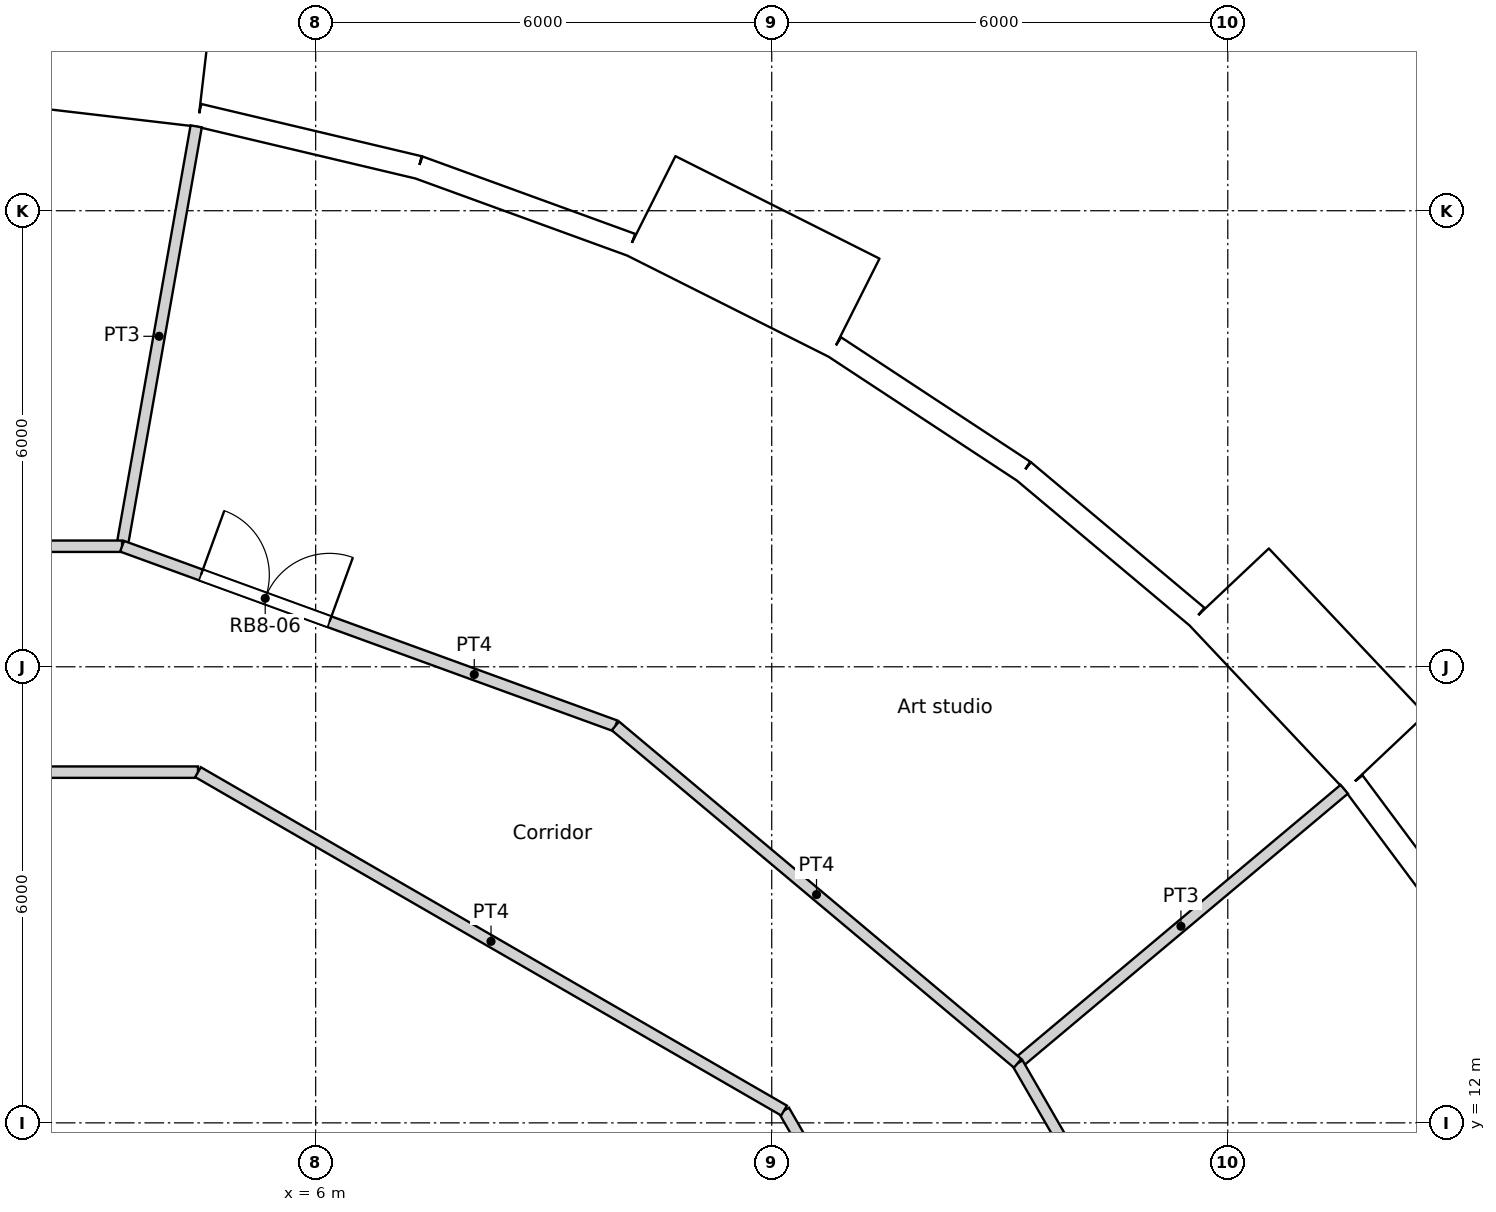
"""IFC4 building model, lengths in metres.
Left out: names, types, materials, properties, quantities, classifications, styles, units other than length and angle.
Written with IfcOpenShell. Run it as: python <this file> out.ifc"""

import sys

from ifc_helpers import new_model, si_unit, direction, frame, frame_2d, origin, origin_2d, place, context, subcontext, project, spatial, rectangle, circle, extrude, element, fill, save


model = new_model("IFC4")
c1 = context("Model", 3, precision=1e-05, world=origin(), true_north=direction((0.0, 1.0)))
c2 = subcontext(c1, "Body", "Model", "MODEL_VIEW")
j1 = project(units=[si_unit("LENGTHUNIT", "METRE"), si_unit("PLANEANGLEUNIT", "RADIAN")], contexts=[c1])
p1 = place(None, origin())
s1 = spatial("IfcSite", under=j1, at=p1, CompositionType="ELEMENT")
p2 = place(p1, origin())
s2 = spatial("IfcBuilding", under=s1, at=p2, CompositionType="ELEMENT")
p3 = place(p2, frame((0.0, 0.0, 201.6)))
s3 = spatial("IfcBuildingStorey", under=s2, at=p3, CompositionType="ELEMENT", Elevation=201.6)
for number, where, z_axis, x_axis in (
    (1, (18.805, 15.779, 0.0), (0.0, 0.0, 1.0), (1.0, 0.0, 0.0)),
    (2, (14.659, 19.69, 0.0), (0.0, 0.0, 1.0), (1.0, 0.0, 0.0)),
    (3, (9.723, 22.54, 0.0), (0.0, 0.0, 1.0), (1.0, 0.0, 0.0)),
    (4, (4.263, 24.175, 0.0), (0.0, 0.0, 1.0), (1.0, 0.0, 0.0)),
):
    element("IfcColumn", number, at=place(p3, frame(where, z_axis=z_axis, x_axis=x_axis)), inside=s3, PredefinedType="COLUMN", context=c2, shape_type="SweptSolid", body=[
        extrude(circle(Radius=0.6, at=origin_2d()), origin(), (0.0, 0.0, 1.0), 3.6),
    ])
for number, where, z_axis, x_axis in (
    (5, (11.735, 14.716, 0.0), (0.0, 0.0, 1.0), (1.0, 0.0, 0.0)),
    (6, (6.876, 17.521, 0.0), (0.0, 0.0, 1.0), (1.0, 0.0, 0.0)),
):
    element("IfcColumn", number, at=place(p3, frame(where, z_axis=z_axis, x_axis=x_axis)), inside=s3, PredefinedType="COLUMN", context=c2, shape_type="SweptSolid", body=[
        extrude(circle(Radius=0.65, at=origin_2d()), origin(), (0.0, 0.0, 1.0), 3.6),
    ])
p4 = place(p3, frame((21.428, 14.094, 0.0), z_axis=(0.0, 0.0, 1.0), x_axis=(-0.597197580538, 0.80209416517, 0.0)))
e7 = element("IfcWall", 7, at=p4, inside=s3, PredefinedType="SOLIDWALL", context=c2, shape_type="SweptSolid", body=[
    extrude(rectangle(XDim=2.973, YDim=0.3, at=frame_2d((1.486, 0.0))), origin(), (0.0, 0.0, 1.0), 3.3),
])
p5 = place(p4, frame((1.486, 0.0, 1.55)))
e8 = element("IfcOpeningElement", 8, at=p5, cuts=e7, PredefinedType="OPENING", context=c2, shape_type="SweptSolid", body=[
    extrude(circle(Radius=0.9, at=origin_2d()), frame((0.0, 0.16, 0.0), z_axis=(0.0, -1.0, 0.0), x_axis=(1.0, 0.0, 0.0)), (0.0, 0.0, 1.0), 0.32),
])
p6 = place(p3, frame((20.071, 16.874, -0.3), z_axis=(0.0, 0.0, 1.0), x_axis=(-0.686217177108, 0.727396718334, 0.0)))
e9 = element("IfcWall", 9, at=p6, inside=s3, PredefinedType="ELEMENTEDWALL", context=c2, shape_type="SweptSolid", body=[
    extrude(rectangle(XDim=3.0, YDim=1.45, at=frame_2d((1.5, 0.0))), origin(), (0.0, 0.0, 1.0), 3.6),
])
p7 = place(p6, frame((1.5, 0.0, 1.85)))
e10 = element("IfcOpeningElement", 10, at=p7, cuts=e9, PredefinedType="OPENING", context=c2, shape_type="SweptSolid", body=[
    extrude(circle(Radius=0.9, at=origin_2d()), frame((0.0, 0.735, 0.0), z_axis=(0.0, -1.0, 0.0), x_axis=(1.0, 0.0, 0.0)), (0.0, 0.0, 1.0), 1.47),
])
p8 = place(p3, frame((17.593, 18.661, 0.0), z_axis=(0.0, 0.0, 1.0), x_axis=(-0.766008913364, 0.642829950023, 0.0)))
e11 = element("IfcWall", 11, at=p8, inside=s3, PredefinedType="SOLIDWALL", context=c2, shape_type="SweptSolid", body=[
    extrude(rectangle(XDim=2.973, YDim=0.3, at=frame_2d((1.486, 0.0))), origin(), (0.0, 0.0, 1.0), 3.3),
])
p9 = place(p8, frame((1.486, 0.0, 1.55)))
e12 = element("IfcOpeningElement", 12, at=p9, cuts=e11, PredefinedType="OPENING", context=c2, shape_type="SweptSolid", body=[
    extrude(circle(Radius=0.9, at=origin_2d()), frame((0.0, 0.16, 0.0), z_axis=(0.0, -1.0, 0.0), x_axis=(1.0, 0.0, 0.0)), (0.0, 0.0, 1.0), 0.32),
])
p10 = place(p3, frame((15.316, 20.573, 0.0), z_axis=(0.0, 0.0, 1.0), x_axis=(-0.835508361394, 0.54947773207, 0.0)))
e13 = element("IfcWall", 13, at=p10, inside=s3, PredefinedType="SOLIDWALL", context=c2, shape_type="SweptSolid", body=[
    extrude(rectangle(XDim=2.973, YDim=0.3, at=frame_2d((1.486, 0.0))), origin(), (0.0, 0.0, 1.0), 3.3),
])
p11 = place(p10, frame((1.486, 0.0, 1.55)))
e14 = element("IfcOpeningElement", 14, at=p11, cuts=e13, PredefinedType="OPENING", context=c2, shape_type="SweptSolid", body=[
    extrude(circle(Radius=0.9, at=origin_2d()), frame((0.0, 0.16, 0.0), z_axis=(0.0, -1.0, 0.0), x_axis=(1.0, 0.0, 0.0)), (0.0, 0.0, 1.0), 0.32),
])
p12 = place(p3, frame((13.09, 22.721, -0.3), z_axis=(0.0, 0.0, 1.0), x_axis=(-0.893628249713, 0.448807922518, 0.0)))
e15 = element("IfcWall", 15, at=p12, inside=s3, PredefinedType="ELEMENTEDWALL", context=c2, shape_type="SweptSolid", body=[
    extrude(rectangle(XDim=3.0, YDim=1.45, at=frame_2d((1.5, 0.0))), origin(), (0.0, 0.0, 1.0), 3.6),
])
p13 = place(p12, frame((1.5, 0.0, 1.85)))
e16 = element("IfcOpeningElement", 16, at=p13, cuts=e15, PredefinedType="OPENING", context=c2, shape_type="SweptSolid", body=[
    extrude(circle(Radius=0.9, at=origin_2d()), frame((0.0, 0.735, 0.0), z_axis=(0.0, -1.0, 0.0), x_axis=(1.0, 0.0, 0.0)), (0.0, 0.0, 1.0), 1.47),
])
p14 = place(p3, frame((10.149, 23.553, 0.0), z_axis=(0.0, 0.0, 1.0), x_axis=(-0.939690282133, 0.342026568652, 0.0)))
e17 = element("IfcWall", 17, at=p14, inside=s3, PredefinedType="SOLIDWALL", context=c2, shape_type="SweptSolid", body=[
    extrude(rectangle(XDim=2.973, YDim=0.3, at=frame_2d((1.486, 0.0))), origin(), (0.0, 0.0, 1.0), 3.3),
])
p15 = place(p14, frame((1.486, 0.0, 1.55)))
e18 = element("IfcOpeningElement", 18, at=p15, cuts=e17, PredefinedType="OPENING", context=c2, shape_type="SweptSolid", body=[
    extrude(circle(Radius=0.9, at=origin_2d()), frame((0.0, 0.16, 0.0), z_axis=(0.0, -1.0, 0.0), x_axis=(1.0, 0.0, 0.0)), (0.0, 0.0, 1.0), 0.32),
])
p16 = place(p3, frame((7.356, 24.57, 0.0), z_axis=(0.0, 0.0, 1.0), x_axis=(-0.973045378923, 0.230613725862, 0.0)))
e19 = element("IfcWall", 19, at=p16, inside=s3, PredefinedType="SOLIDWALL", context=c2, shape_type="SweptSolid", body=[
    extrude(rectangle(XDim=2.973, YDim=0.3, at=frame_2d((1.486, 0.0))), origin(), (0.0, 0.0, 1.0), 3.3),
])
p17 = place(p16, frame((1.486, 0.0, 1.55)))
e20 = element("IfcOpeningElement", 20, at=p17, cuts=e19, PredefinedType="OPENING", context=c2, shape_type="SweptSolid", body=[
    extrude(circle(Radius=0.9, at=origin_2d()), frame((0.0, 0.16, 0.0), z_axis=(0.0, -1.0, 0.0), x_axis=(1.0, 0.0, 0.0)), (0.0, 0.0, 1.0), 0.32),
])
p18 = place(p3, frame((4.529, 25.828, -0.3), z_axis=(0.0, 0.0, 1.0), x_axis=(-0.9932342274, 0.116128246006, 0.0)))
e21 = element("IfcWall", 21, at=p18, inside=s3, PredefinedType="ELEMENTEDWALL", context=c2, shape_type="SweptSolid", body=[
    extrude(rectangle(XDim=3.0, YDim=1.45, at=frame_2d((1.5, 0.0))), origin(), (0.0, 0.0, 1.0), 3.6),
])
p19 = place(p18, frame((1.5, 0.0, 1.85)))
e22 = element("IfcOpeningElement", 22, at=p19, cuts=e21, PredefinedType="OPENING", context=c2, shape_type="SweptSolid", body=[
    extrude(circle(Radius=0.9, at=origin_2d()), frame((0.0, 0.735, 0.0), z_axis=(0.0, -1.0, 0.0), x_axis=(1.0, 0.0, 0.0)), (0.0, 0.0, 1.0), 1.47),
])
p20 = place(p3, frame((12.162, 12.162, 0.0), z_axis=(0.0, 0.0, 1.0), x_axis=(0.499961633463, -0.866047553582, 0.0)))
e23 = element("IfcWall", 23, at=p20, inside=s3, PredefinedType="PARTITIONING", context=c2, shape_type="SweptSolid", body=[
    extrude(rectangle(XDim=2.15, YDim=0.15, at=frame_2d((1.075, 0.0))), origin(), (0.0, 0.0, 1.0), 3.3),
])
p21 = place(p3, frame((15.235, 12.784, 0.0), z_axis=(0.0, 0.0, 1.0), x_axis=(0.499914202267, -0.866074933462, 0.0)))
e24 = element("IfcWall", 24, at=p21, inside=s3, PredefinedType="PARTITIONING", context=c2, shape_type="SweptSolid", body=[
    extrude(rectangle(XDim=6.907, YDim=0.15, at=frame_2d((3.454, 0.0))), origin(), (0.0, 0.0, 1.0), 3.3),
])
p22 = place(p21, frame((3.004, 0.0, 0.0)))
e25 = element("IfcOpeningElement", 25, at=p22, cuts=e24, PredefinedType="OPENING", context=c2, shape_type="SweptSolid", body=[
    extrude(rectangle(XDim=1.8, YDim=2.1, at=frame_2d((0.9, 1.05))), frame((0.0, 0.075, 0.0), z_axis=(0.0, -1.0, 0.0), x_axis=(1.0, 0.0, 0.0)), (0.0, 0.0, 1.0), 0.15),
])
p23 = place(p3, frame((9.943, 17.222, 0.0), z_axis=(0.0, 0.0, 1.0), x_axis=(0.766192104565, -0.642611592567, 0.0)))
e26 = element("IfcWall", 26, at=p23, inside=s3, PredefinedType="PARTITIONING", context=c2, shape_type="SweptSolid", body=[
    extrude(rectangle(XDim=6.906, YDim=0.15, at=frame_2d((3.453, 0.0))), origin(), (0.0, 0.0, 1.0), 3.3),
])
p24 = place(p3, frame((4.452, 16.614, 0.0), z_axis=(0.0, 0.0, 1.0), x_axis=(0.866005203721, -0.500034985904, 0.0)))
e27 = element("IfcWall", 27, at=p24, inside=s3, PredefinedType="PARTITIONING", context=c2, shape_type="SweptSolid", body=[
    extrude(rectangle(XDim=8.903, YDim=0.15, at=frame_2d((4.452, 0.0))), origin(), (0.0, 0.0, 1.0), 3.3),
])
p25 = place(p3, frame((-3.021, 16.614, 0.0), z_axis=(0.0, 0.0, 1.0), x_axis=(1.0, 0.0, 0.0)))
e28 = element("IfcWall", 28, at=p25, inside=s3, PredefinedType="PARTITIONING", context=c2, shape_type="SweptSolid", body=[
    extrude(rectangle(XDim=7.473, YDim=0.15, at=frame_2d((3.736, 0.0))), origin(), (0.0, 0.0, 1.0), 3.3),
])
p26 = place(p3, frame((3.453, 19.586, 0.0), z_axis=(0.0, 0.0, 1.0), x_axis=(0.939672634566, -0.342075050021, 0.0)))
e29 = element("IfcWall", 29, at=p26, inside=s3, PredefinedType="PARTITIONING", context=c2, shape_type="SweptSolid", body=[
    extrude(rectangle(XDim=6.908, YDim=0.15, at=frame_2d((3.454, 0.0))), origin(), (0.0, 0.0, 1.0), 3.3),
])
p27 = place(p26, frame((1.104, 0.0, 0.0)))
e30 = element("IfcOpeningElement", 30, at=p27, cuts=e29, PredefinedType="OPENING", context=c2, shape_type="SweptSolid", body=[
    extrude(rectangle(XDim=1.8, YDim=2.1, at=frame_2d((0.9, 1.05))), frame((0.0, 0.075, 0.0), z_axis=(0.0, -1.0, 0.0), x_axis=(1.0, 0.0, 0.0)), (0.0, 0.0, 1.0), 0.15),
])
p28 = place(p3, frame((-3.453, 19.586, 0.0), z_axis=(0.0, 0.0, 1.0), x_axis=(1.0, 0.0, 0.0)))
e31 = element("IfcWall", 31, at=p28, inside=s3, PredefinedType="PARTITIONING", context=c2, shape_type="SweptSolid", body=[
    extrude(rectangle(XDim=6.906, YDim=0.15, at=frame_2d((3.453, 0.0))), origin(), (0.0, 0.0, 1.0), 3.3),
])
p29 = place(p3, frame((15.235, 12.784, 0.0), z_axis=(0.0, 0.0, 1.0), x_axis=(0.76609059793, 0.642732600514, 0.0)))
e32 = element("IfcWall", 32, at=p29, inside=s3, PredefinedType="PARTITIONING", context=c2, shape_type="SweptSolid", body=[
    extrude(rectangle(XDim=5.609, YDim=0.15, at=frame_2d((2.804, 0.0))), origin(), (0.0, 0.0, 1.0), 3.3),
])
p30 = place(p3, frame((3.453, 19.586, 0.0), z_axis=(0.0, 0.0, 1.0), x_axis=(0.17382754149, 0.984776109489, 0.0)))
e33 = element("IfcWall", 33, at=p30, inside=s3, PredefinedType="PARTITIONING", context=c2, shape_type="SweptSolid", body=[
    extrude(rectangle(XDim=5.61, YDim=0.15, at=frame_2d((2.805, 0.0))), origin(), (0.0, 0.0, 1.0), 3.3),
])
p31 = place(p5, origin())
e34 = element("IfcWindow", 34, at=p31, inside=s3, PartitioningType="SINGLE_PANEL", PredefinedType="WINDOW", context=c2, shape_type="SweptSolid", body=[
    extrude(circle(Radius=0.9, at=origin_2d()), frame((0.0, 0.12, 0.0), z_axis=(0.0, -1.0, 0.0), x_axis=(1.0, 0.0, 0.0)), (0.0, 0.0, 1.0), 0.1),
])
fill(e8, e34)
p32 = place(p7, origin())
e35 = element("IfcWindow", 35, at=p32, inside=s3, PartitioningType="SINGLE_PANEL", PredefinedType="WINDOW", context=c2, shape_type="SweptSolid", body=[
    extrude(circle(Radius=0.9, at=origin_2d()), frame((0.0, 0.695, 0.0), z_axis=(0.0, -1.0, 0.0), x_axis=(1.0, 0.0, 0.0)), (0.0, 0.0, 1.0), 0.1),
])
fill(e10, e35)
p33 = place(p9, origin())
e36 = element("IfcWindow", 36, at=p33, inside=s3, PartitioningType="SINGLE_PANEL", PredefinedType="WINDOW", context=c2, shape_type="SweptSolid", body=[
    extrude(circle(Radius=0.9, at=origin_2d()), frame((0.0, 0.12, 0.0), z_axis=(0.0, -1.0, 0.0), x_axis=(1.0, 0.0, 0.0)), (0.0, 0.0, 1.0), 0.1),
])
fill(e12, e36)
p34 = place(p11, origin())
e37 = element("IfcWindow", 37, at=p34, inside=s3, PartitioningType="SINGLE_PANEL", PredefinedType="WINDOW", context=c2, shape_type="SweptSolid", body=[
    extrude(circle(Radius=0.9, at=origin_2d()), frame((0.0, 0.12, 0.0), z_axis=(0.0, -1.0, 0.0), x_axis=(1.0, 0.0, 0.0)), (0.0, 0.0, 1.0), 0.1),
])
fill(e14, e37)
p35 = place(p13, origin())
e38 = element("IfcWindow", 38, at=p35, inside=s3, PartitioningType="SINGLE_PANEL", PredefinedType="WINDOW", context=c2, shape_type="SweptSolid", body=[
    extrude(circle(Radius=0.9, at=origin_2d()), frame((0.0, 0.695, 0.0), z_axis=(0.0, -1.0, 0.0), x_axis=(1.0, 0.0, 0.0)), (0.0, 0.0, 1.0), 0.1),
])
fill(e16, e38)
p36 = place(p15, origin())
e39 = element("IfcWindow", 39, at=p36, inside=s3, PartitioningType="SINGLE_PANEL", PredefinedType="WINDOW", context=c2, shape_type="SweptSolid", body=[
    extrude(circle(Radius=0.9, at=origin_2d()), frame((0.0, 0.12, 0.0), z_axis=(0.0, -1.0, 0.0), x_axis=(1.0, 0.0, 0.0)), (0.0, 0.0, 1.0), 0.1),
])
fill(e18, e39)
p37 = place(p17, origin())
e40 = element("IfcWindow", 40, at=p37, inside=s3, PartitioningType="SINGLE_PANEL", PredefinedType="WINDOW", context=c2, shape_type="SweptSolid", body=[
    extrude(circle(Radius=0.9, at=origin_2d()), frame((0.0, 0.12, 0.0), z_axis=(0.0, -1.0, 0.0), x_axis=(1.0, 0.0, 0.0)), (0.0, 0.0, 1.0), 0.1),
])
fill(e20, e40)
p38 = place(p19, origin())
e41 = element("IfcWindow", 41, at=p38, inside=s3, PartitioningType="SINGLE_PANEL", PredefinedType="WINDOW", context=c2, shape_type="SweptSolid", body=[
    extrude(circle(Radius=0.9, at=origin_2d()), frame((0.0, 0.695, 0.0), z_axis=(0.0, -1.0, 0.0), x_axis=(1.0, 0.0, 0.0)), (0.0, 0.0, 1.0), 0.1),
])
fill(e22, e41)
p39 = place(p27, origin())
e42 = element("IfcDoor", 42, at=p39, inside=s3, OperationType="DOUBLE_DOOR_SINGLE_SWING", PredefinedType="DOOR", context=c2, shape_type="SweptSolid", body=[
    extrude(rectangle(XDim=1.8, YDim=2.1, at=frame_2d((0.9, 1.05))), frame((0.0, 0.025, 0.0), z_axis=(0.0, -1.0, 0.0), x_axis=(1.0, 0.0, 0.0)), (0.0, 0.0, 1.0), 0.05),
])
fill(e30, e42)
save(model, sys.argv[1])
